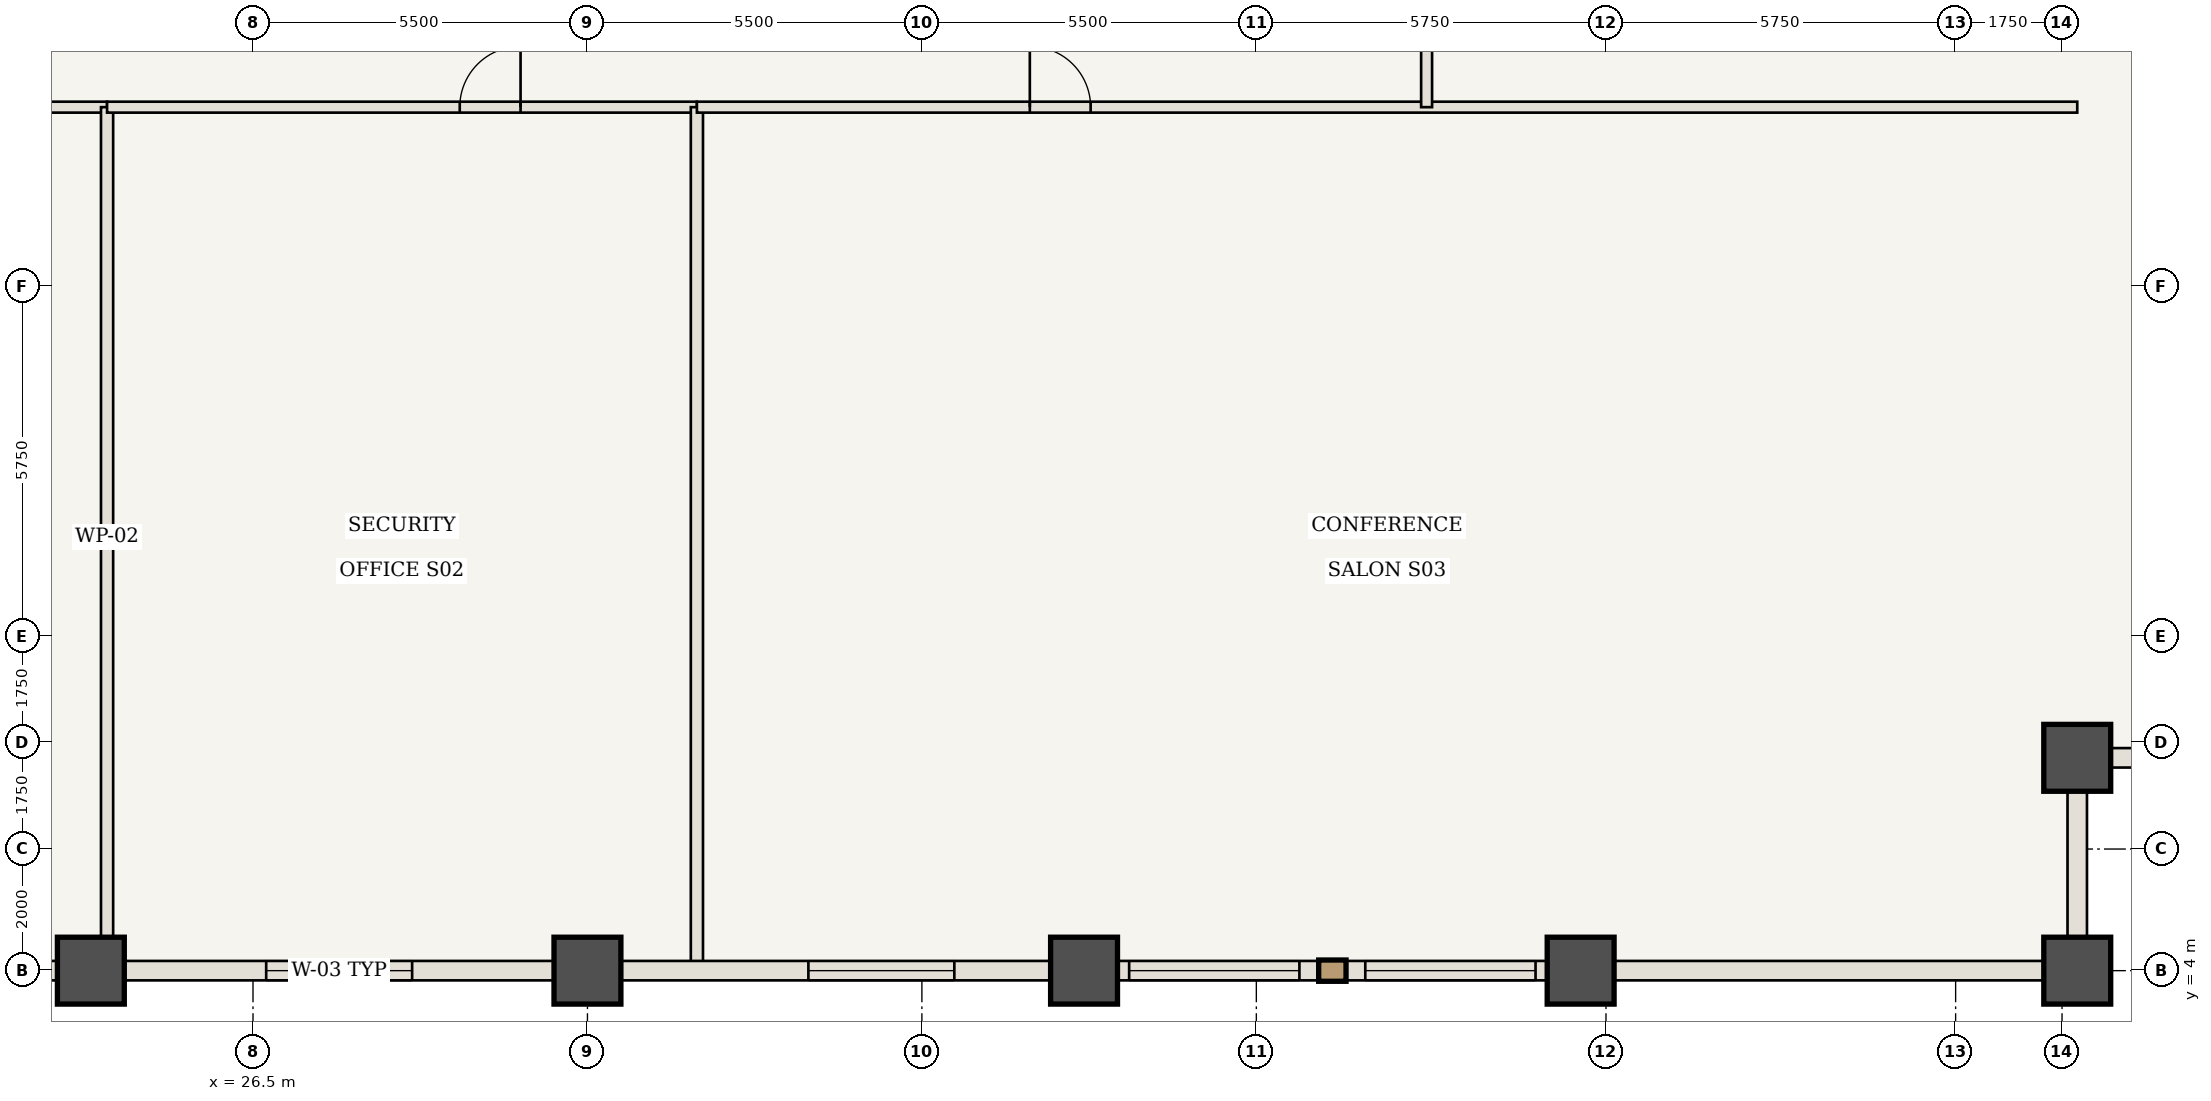
"""IFC4 building model, lengths in metres.
Left out: names, types, materials, properties, quantities, classifications, styles, units other than length and angle.
Written with IfcOpenShell. Run it as: python <this file> out.ifc"""

import sys

from ifc_helpers import new_model, si_unit, direction, frame, frame_2d, origin, origin_2d, place, context, subcontext, project, spatial, rectangle, extrude, element, fill, save


model = new_model("IFC4")
c1 = context("Model", 3, precision=1e-05, world=origin(), true_north=direction((0.0, 1.0)))
c2 = subcontext(c1, "Body", "Model", "MODEL_VIEW")
j1 = project(units=[si_unit("LENGTHUNIT", "METRE"), si_unit("PLANEANGLEUNIT", "RADIAN")], contexts=[c1])
p1 = place(None, origin())
s1 = spatial("IfcSite", under=j1, at=p1, CompositionType="ELEMENT")
p2 = place(p1, origin())
s2 = spatial("IfcBuilding", under=s1, at=p2, CompositionType="ELEMENT")
p3 = place(p2, frame((0.0, 0.0, 92.75)))
s3 = spatial("IfcBuildingStorey", under=s2, at=p3, CompositionType="ELEMENT", Elevation=92.75)
for number, where, z_axis, x_axis in (
    (1, (56.5, 4.0, 0.0), (0.0, 0.0, 1.0), (1.0, 0.0, 0.0)),
    (2, (56.5, 7.5, 0.0), (0.0, 0.0, 1.0), (1.0, 0.0, 0.0)),
    (3, (23.833, 4.0, 0.0), (0.0, 0.0, 1.0), (1.0, 0.0, 0.0)),
    (4, (32.0, 4.0, 0.0), (0.0, 0.0, 1.0), (1.0, 0.0, 0.0)),
    (5, (40.167, 4.0, 0.0), (0.0, 0.0, 1.0), (1.0, 0.0, 0.0)),
    (6, (48.333, 4.0, 0.0), (0.0, 0.0, 1.0), (1.0, 0.0, 0.0)),
):
    element("IfcColumn", number, at=place(p3, frame(where, z_axis=z_axis, x_axis=x_axis)), inside=s3, PredefinedType="COLUMN", context=c2, shape_type="SweptSolid", body=[
        extrude(rectangle(XDim=1.1, YDim=1.1, at=origin_2d()), origin(), (0.0, 0.0, 1.0), 3.5),
    ])
p4 = place(p3, frame((7.5, 18.2, 0.0), z_axis=(0.0, 0.0, 1.0), x_axis=(1.0, 0.0, 0.0)))
e7 = element("IfcWall", 7, at=p4, inside=s3, PredefinedType="STANDARD", context=c2, shape_type="SweptSolid", body=[
    extrude(rectangle(XDim=16.6, YDim=0.18, at=frame_2d((8.3, 0.0))), origin(), (0.0, 0.0, 1.0), 3.28),
])
p5 = place(p4, frame((11.725, 0.0, 0.0)))
e8 = element("IfcOpeningElement", 8, at=p5, cuts=e7, PredefinedType="OPENING", context=c2, shape_type="SweptSolid", body=[
    extrude(rectangle(XDim=1.0, YDim=2.15, at=frame_2d((0.5, 1.075))), frame((0.0, 0.1, 0.0), z_axis=(0.0, -1.0, 0.0), x_axis=(1.0, 0.0, 0.0)), (0.0, 0.0, 1.0), 0.2),
])
p6 = place(p3, frame((24.1, 4.06, 0.0), z_axis=(0.0, 0.0, 1.0), x_axis=(0.0, 1.0, 0.0)))
e9 = element("IfcWall", 9, at=p6, inside=s3, PredefinedType="STANDARD", context=c2, shape_type="SweptSolid", body=[
    extrude(rectangle(XDim=14.14, YDim=0.2, at=frame_2d((7.07, 0.0))), origin(), (0.0, 0.0, 1.0), 3.28),
])
p7 = place(p3, frame((24.1, 18.2, 0.0), z_axis=(0.0, 0.0, 1.0), x_axis=(1.0, 0.0, 0.0)))
e10 = element("IfcWall", 10, at=p7, inside=s3, PredefinedType="STANDARD", context=c2, shape_type="SweptSolid", body=[
    extrude(rectangle(XDim=9.7, YDim=0.18, at=frame_2d((4.85, 0.0))), origin(), (0.0, 0.0, 1.0), 3.28),
])
p8 = place(p7, frame((5.8, 0.0, 0.0)))
e11 = element("IfcOpeningElement", 11, at=p8, cuts=e10, PredefinedType="OPENING", context=c2, shape_type="SweptSolid", body=[
    extrude(rectangle(XDim=1.0, YDim=2.15, at=frame_2d((0.5, 1.075))), frame((0.0, 0.1, 0.0), z_axis=(0.0, -1.0, 0.0), x_axis=(1.0, 0.0, 0.0)), (0.0, 0.0, 1.0), 0.2),
])
p9 = place(p3, frame((33.8, 4.06, 0.0), z_axis=(0.0, 0.0, 1.0), x_axis=(0.0, 1.0, 0.0)))
e12 = element("IfcWall", 12, at=p9, inside=s3, PredefinedType="STANDARD", context=c2, shape_type="SweptSolid", body=[
    extrude(rectangle(XDim=14.14, YDim=0.2, at=frame_2d((7.07, 0.0))), origin(), (0.0, 0.0, 1.0), 3.28),
])
p10 = place(p3, frame((33.8, 18.2, 0.0), z_axis=(0.0, 0.0, 1.0), x_axis=(1.0, 0.0, 0.0)))
e13 = element("IfcWall", 13, at=p10, inside=s3, PredefinedType="STANDARD", context=c2, shape_type="SweptSolid", body=[
    extrude(rectangle(XDim=22.7, YDim=0.18, at=frame_2d((11.35, 0.0))), origin(), (0.0, 0.0, 1.0), 3.28),
])
p11 = place(p10, frame((5.475, 0.0, 0.0)))
e14 = element("IfcOpeningElement", 14, at=p11, cuts=e13, PredefinedType="OPENING", context=c2, shape_type="SweptSolid", body=[
    extrude(rectangle(XDim=1.0, YDim=2.15, at=frame_2d((0.5, 1.075))), frame((0.0, 0.1, 0.0), z_axis=(0.0, -1.0, 0.0), x_axis=(1.0, 0.0, 0.0)), (0.0, 0.0, 1.0), 0.2),
])
p12 = place(p3, frame((45.8, 18.2, 0.0), z_axis=(0.0, 0.0, 1.0), x_axis=(0.0, 1.0, 0.0)))
e15 = element("IfcWall", 15, at=p12, inside=s3, PredefinedType="STANDARD", context=c2, shape_type="SweptSolid", body=[
    extrude(rectangle(XDim=8.3, YDim=0.18, at=frame_2d((4.15, 0.0))), origin(), (0.0, 0.0, 1.0), 3.28),
])
p13 = place(p12, frame((3.65, 0.0, 0.0)))
e16 = element("IfcOpeningElement", 16, at=p13, cuts=e15, PredefinedType="OPENING", context=c2, shape_type="SweptSolid", body=[
    extrude(rectangle(XDim=1.0, YDim=2.15, at=frame_2d((0.5, 1.075))), frame((0.0, 0.1, 0.0), z_axis=(0.0, -1.0, 0.0), x_axis=(1.0, 0.0, 0.0)), (0.0, 0.0, 1.0), 0.2),
])
p14 = place(p3, frame((23.833, 4.0, 0.0), z_axis=(0.0, 0.0, 1.0), x_axis=(-1.0, 0.0, 0.0)))
e17 = element("IfcWall", 17, at=p14, inside=s3, PredefinedType="USERDEFINED", context=c2, shape_type="SweptSolid", body=[
    extrude(rectangle(XDim=8.167, YDim=0.32, at=frame_2d((4.083, 0.0))), origin(), (0.0, 0.0, 1.0), 2.48),
])
p15 = place(p14, frame((0.742, 0.0, 0.85)))
e18 = element("IfcOpeningElement", 18, at=p15, cuts=e17, PredefinedType="OPENING", context=c2, shape_type="SweptSolid", body=[
    extrude(rectangle(XDim=2.8, YDim=1.43, at=frame_2d((1.4, 0.715))), frame((0.0, 0.17, 0.0), z_axis=(0.0, -1.0, 0.0), x_axis=(1.0, 0.0, 0.0)), (0.0, 0.0, 1.0), 0.34),
])
p16 = place(p14, frame((4.625, 0.0, 0.85)))
e19 = element("IfcOpeningElement", 19, at=p16, cuts=e17, PredefinedType="OPENING", context=c2, shape_type="SweptSolid", body=[
    extrude(rectangle(XDim=2.8, YDim=1.43, at=frame_2d((1.4, 0.715))), frame((0.0, 0.17, 0.0), z_axis=(0.0, -1.0, 0.0), x_axis=(1.0, 0.0, 0.0)), (0.0, 0.0, 1.0), 0.34),
])
p17 = place(p3, frame((32.0, 4.0, 0.0), z_axis=(0.0, 0.0, 1.0), x_axis=(-1.0, 0.0, 0.0)))
e20 = element("IfcWall", 20, at=p17, inside=s3, PredefinedType="USERDEFINED", context=c2, shape_type="SweptSolid", body=[
    extrude(rectangle(XDim=8.167, YDim=0.32, at=frame_2d((4.083, 0.0))), origin(), (0.0, 0.0, 1.0), 2.48),
])
p18 = place(p17, frame((2.883, 0.0, 0.85)))
e21 = element("IfcOpeningElement", 21, at=p18, cuts=e20, PredefinedType="OPENING", context=c2, shape_type="SweptSolid", body=[
    extrude(rectangle(XDim=2.4, YDim=1.43, at=frame_2d((1.2, 0.715))), frame((0.0, 0.17, 0.0), z_axis=(0.0, -1.0, 0.0), x_axis=(1.0, 0.0, 0.0)), (0.0, 0.0, 1.0), 0.34),
])
p19 = place(p3, frame((40.167, 4.0, 0.0), z_axis=(0.0, 0.0, 1.0), x_axis=(-1.0, 0.0, 0.0)))
e22 = element("IfcWall", 22, at=p19, inside=s3, PredefinedType="USERDEFINED", context=c2, shape_type="SweptSolid", body=[
    extrude(rectangle(XDim=8.167, YDim=0.32, at=frame_2d((4.083, 0.0))), origin(), (0.0, 0.0, 1.0), 2.48),
])
p20 = place(p19, frame((2.133, 0.0, 0.85)))
e23 = element("IfcOpeningElement", 23, at=p20, cuts=e22, PredefinedType="OPENING", context=c2, shape_type="SweptSolid", body=[
    extrude(rectangle(XDim=2.4, YDim=1.43, at=frame_2d((1.2, 0.715))), frame((0.0, 0.17, 0.0), z_axis=(0.0, -1.0, 0.0), x_axis=(1.0, 0.0, 0.0)), (0.0, 0.0, 1.0), 0.34),
])
p21 = place(p3, frame((48.333, 4.0, 0.0), z_axis=(0.0, 0.0, 1.0), x_axis=(-1.0, 0.0, 0.0)))
e24 = element("IfcWall", 24, at=p21, inside=s3, PredefinedType="USERDEFINED", context=c2, shape_type="SweptSolid", body=[
    extrude(rectangle(XDim=8.167, YDim=0.32, at=frame_2d((4.083, 0.0))), origin(), (0.0, 0.0, 1.0), 2.48),
])
p22 = place(p21, frame((0.742, 0.0, 0.85)))
e25 = element("IfcOpeningElement", 25, at=p22, cuts=e24, PredefinedType="OPENING", context=c2, shape_type="SweptSolid", body=[
    extrude(rectangle(XDim=2.8, YDim=1.43, at=frame_2d((1.4, 0.715))), frame((0.0, 0.17, 0.0), z_axis=(0.0, -1.0, 0.0), x_axis=(1.0, 0.0, 0.0)), (0.0, 0.0, 1.0), 0.34),
])
p23 = place(p21, frame((4.625, 0.0, 0.85)))
e26 = element("IfcOpeningElement", 26, at=p23, cuts=e24, PredefinedType="OPENING", context=c2, shape_type="SweptSolid", body=[
    extrude(rectangle(XDim=2.8, YDim=1.43, at=frame_2d((1.4, 0.715))), frame((0.0, 0.17, 0.0), z_axis=(0.0, -1.0, 0.0), x_axis=(1.0, 0.0, 0.0)), (0.0, 0.0, 1.0), 0.34),
])
p24 = place(p3, frame((56.5, 4.0, 0.0), z_axis=(0.0, 0.0, 1.0), x_axis=(-1.0, 0.0, 0.0)))
e27 = element("IfcWall", 27, at=p24, inside=s3, PredefinedType="USERDEFINED", context=c2, shape_type="SweptSolid", body=[
    extrude(rectangle(XDim=8.167, YDim=0.32, at=frame_2d((4.083, 0.0))), origin(), (0.0, 0.0, 1.0), 2.48),
])
for number, where, z_axis, x_axis in (
    (28, (56.5, 7.5, 0.0), (0.0, 0.0, 1.0), (0.0, -1.0, 0.0)),
    (29, (60.0, 7.5, 0.0), (0.0, 0.0, 1.0), (-1.0, 0.0, 0.0)),
):
    element("IfcWall", number, at=place(p3, frame(where, z_axis=z_axis, x_axis=x_axis)), inside=s3, PredefinedType="USERDEFINED", context=c2, shape_type="SweptSolid", body=[
        extrude(rectangle(XDim=3.5, YDim=0.32, at=frame_2d((1.75, 0.0))), origin(), (0.0, 0.0, 1.0), 2.48),
    ])
p25 = place(p8, origin())
e30 = element("IfcDoor", 30, at=p25, inside=s3, OperationType="SINGLE_SWING_RIGHT", PredefinedType="DOOR", context=c2, shape_type="SweptSolid", body=[
    extrude(rectangle(XDim=1.0, YDim=2.15, at=frame_2d((0.5, 1.075))), frame((0.0, 0.025, 0.0), z_axis=(0.0, -1.0, 0.0), x_axis=(1.0, 0.0, 0.0)), (0.0, 0.0, 1.0), 0.05),
])
fill(e11, e30)
p26 = place(p11, origin())
e31 = element("IfcDoor", 31, at=p26, inside=s3, OperationType="SINGLE_SWING_LEFT", PredefinedType="DOOR", context=c2, shape_type="SweptSolid", body=[
    extrude(rectangle(XDim=1.0, YDim=2.15, at=frame_2d((0.5, 1.075))), frame((0.0, 0.025, 0.0), z_axis=(0.0, -1.0, 0.0), x_axis=(1.0, 0.0, 0.0)), (0.0, 0.0, 1.0), 0.05),
])
fill(e14, e31)
p27 = place(p18, origin())
e32 = element("IfcWindow", 32, at=p27, inside=s3, PartitioningType="SINGLE_PANEL", PredefinedType="WINDOW", context=c2, shape_type="SweptSolid", body=[
    extrude(rectangle(XDim=2.4, YDim=1.43, at=frame_2d((1.2, 0.715))), frame((0.0, 0.03, 0.0), z_axis=(0.0, -1.0, 0.0), x_axis=(1.0, 0.0, 0.0)), (0.0, 0.0, 1.0), 0.06),
])
fill(e21, e32)
p28 = place(p20, origin())
e33 = element("IfcWindow", 33, at=p28, inside=s3, PartitioningType="SINGLE_PANEL", PredefinedType="WINDOW", context=c2, shape_type="SweptSolid", body=[
    extrude(rectangle(XDim=2.4, YDim=1.43, at=frame_2d((1.2, 0.715))), frame((0.0, 0.03, 0.0), z_axis=(0.0, -1.0, 0.0), x_axis=(1.0, 0.0, 0.0)), (0.0, 0.0, 1.0), 0.06),
])
fill(e23, e33)
p29 = place(p22, origin())
e34 = element("IfcWindow", 34, at=p29, inside=s3, PartitioningType="SINGLE_PANEL", PredefinedType="WINDOW", context=c2, shape_type="SweptSolid", body=[
    extrude(rectangle(XDim=2.8, YDim=1.43, at=frame_2d((1.4, 0.715))), frame((0.0, 0.03, 0.0), z_axis=(0.0, -1.0, 0.0), x_axis=(1.0, 0.0, 0.0)), (0.0, 0.0, 1.0), 0.06),
])
fill(e25, e34)
p30 = place(p23, origin())
e35 = element("IfcWindow", 35, at=p30, inside=s3, PartitioningType="SINGLE_PANEL", PredefinedType="WINDOW", context=c2, shape_type="SweptSolid", body=[
    extrude(rectangle(XDim=2.8, YDim=1.43, at=frame_2d((1.4, 0.715))), frame((0.0, 0.03, 0.0), z_axis=(0.0, -1.0, 0.0), x_axis=(1.0, 0.0, 0.0)), (0.0, 0.0, 1.0), 0.06),
])
fill(e26, e35)
save(model, sys.argv[1])
